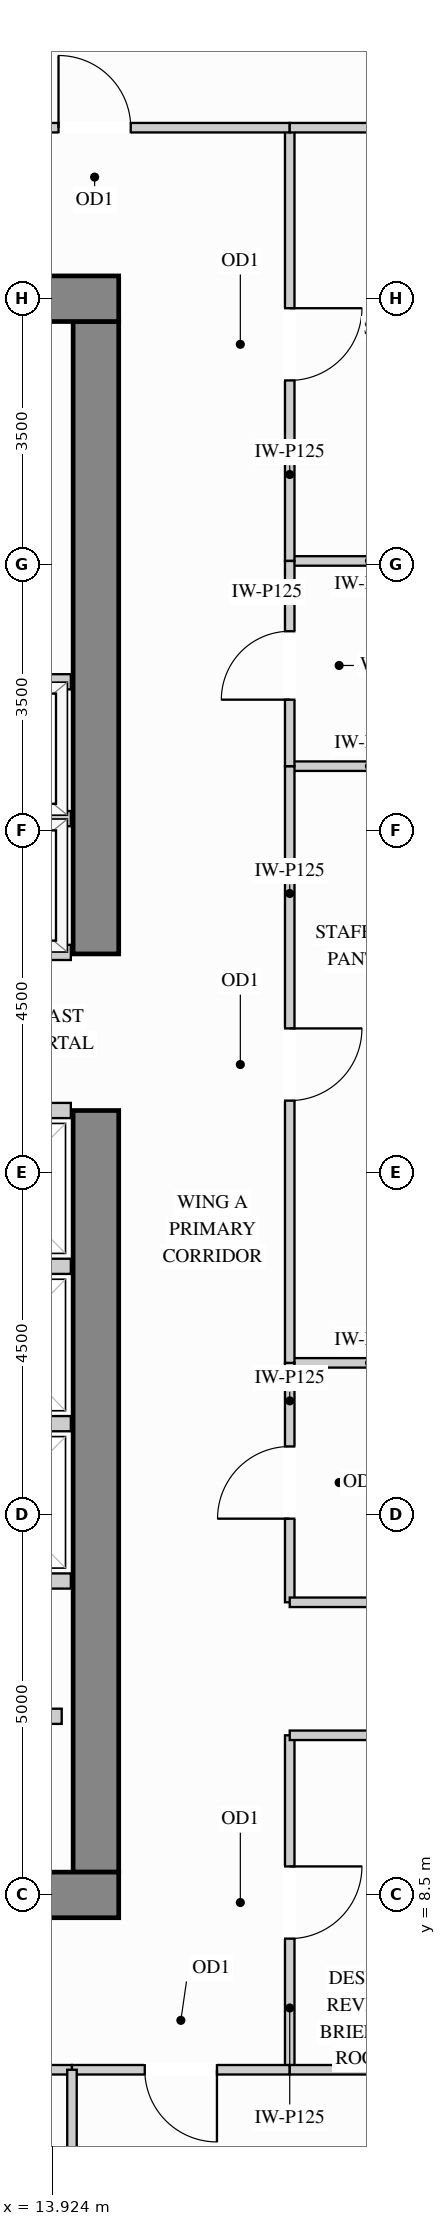
"""IFC4 building model, lengths in metres.
Left out: names, types, materials, properties, quantities, classifications, styles, units other than length and angle.
Written with IfcOpenShell. Run it as: python <this file> out.ifc"""

import sys

from ifc_helpers import new_model, si_unit, direction, frame, frame_2d, origin, place, context, subcontext, project, spatial, rectangle, extrude, source, transform, mapped, element, fill, save


model = new_model("IFC4")
c1 = context("Model", 3, precision=1e-05, world=origin(), true_north=direction((0.0, 1.0)))
c2 = subcontext(c1, "Body", "Model", "MODEL_VIEW")
j1 = project(units=[si_unit("LENGTHUNIT", "METRE"), si_unit("PLANEANGLEUNIT", "RADIAN")], contexts=[c1])
p1 = place(None, origin())
s1 = spatial("IfcSite", under=j1, at=p1, CompositionType="ELEMENT")
p2 = place(p1, origin())
s2 = spatial("IfcBuilding", under=s1, at=p2, CompositionType="ELEMENT")
p3 = place(p2, frame((0.0, 0.0, 175.5)))
s3 = spatial("IfcBuildingStorey", under=s2, at=p3, CompositionType="ELEMENT", Elevation=175.5)
m1 = source(origin(), c2, "Body", "SweptSolid", [
    extrude(rectangle(XDim=10.02, YDim=0.6, at=frame_2d((5.01, 0.0))), origin(), (0.0, 0.0, 1.0), 3.4),
])
p4 = place(p3, frame((14.5, 8.8, 0.0), z_axis=(0.0, 0.0, 1.0), x_axis=(0.0, 1.0, 0.0)))
e1 = element("IfcWall", 1, at=p4, inside=s3, PredefinedType="SHEAR", context=c2, shape_type="MappedRepresentation", body=[
    mapped(m1, transform((0.0, 0.0, 0.0), x_axis=(1.0, 0.0, 0.0), y_axis=(0.0, 1.0, 0.0), z_axis=(0.0, 0.0, 1.0))),
])
m2 = source(origin(), c2, "Body", "SweptSolid", [
    extrude(rectangle(XDim=8.32, YDim=0.6, at=frame_2d((4.16, 0.0))), origin(), (0.0, 0.0, 1.0), 3.4),
])
p5 = place(p3, frame((14.5, 20.88, 0.0), z_axis=(0.0, 0.0, 1.0), x_axis=(0.0, 1.0, 0.0)))
e2 = element("IfcWall", 2, at=p5, inside=s3, PredefinedType="SHEAR", context=c2, shape_type="MappedRepresentation", body=[
    mapped(m2, transform((0.0, 0.0, 0.0), x_axis=(1.0, 0.0, 0.0), y_axis=(0.0, 1.0, 0.0), z_axis=(0.0, 0.0, 1.0))),
])
m3 = source(origin(), c2, "Body", "SweptSolid", [
    extrude(rectangle(XDim=10.6, YDim=0.6, at=frame_2d((5.3, 0.0))), origin(), (0.0, 0.0, 1.0), 3.4),
])
for number, where, z_axis, x_axis in (
    (3, (4.2, 29.5, 0.0), (0.0, 0.0, 1.0), (1.0, 0.0, 0.0)),
    (4, (4.2, 8.5, 0.0), (0.0, 0.0, 1.0), (1.0, 0.0, 0.0)),
):
    element("IfcWall", number, at=place(p3, frame(where, z_axis=z_axis, x_axis=x_axis)), inside=s3, PredefinedType="SHEAR", context=c2, shape_type="MappedRepresentation", body=[
        mapped(m3, transform((0.0, 0.0, 0.0), x_axis=(1.0, 0.0, 0.0), y_axis=(0.0, 1.0, 0.0), z_axis=(0.0, 0.0, 1.0))),
    ])
m4 = source(origin(), c2, "Body", "SweptSolid", [
    extrude(rectangle(XDim=2.1, YDim=0.125, at=frame_2d((1.05, 0.0))), origin(), (0.0, 0.0, 1.0), 3.385),
])
p6 = place(p3, frame((17.05, 15.5, 0.0), z_axis=(0.0, 0.0, 1.0), x_axis=(1.0, 0.0, 0.0)))
e5 = element("IfcWall", 5, at=p6, inside=s3, PredefinedType="PARTITIONING", context=c2, shape_type="MappedRepresentation", body=[
    mapped(m4, transform((0.0, 0.0, 0.0), x_axis=(1.0, 0.0, 0.0), y_axis=(0.0, 1.0, 0.0), z_axis=(0.0, 0.0, 1.0))),
])
m5 = source(origin(), c2, "Body", "SweptSolid", [
    extrude(rectangle(XDim=2.098, YDim=0.125, at=frame_2d((1.049, 0.0))), origin(), (0.0, 0.0, 1.0), 3.385),
])
for number, where, z_axis, x_axis in (
    (6, (17.05, 23.35, 0.0), (0.0, 0.0, 1.0), (1.0, 0.0, 0.0)),
    (7, (17.05, 26.05, 0.0), (0.0, 0.0, 1.0), (1.0, 0.0, 0.0)),
):
    element("IfcWall", number, at=place(p3, frame(where, z_axis=z_axis, x_axis=x_axis)), inside=s3, PredefinedType="PARTITIONING", context=c2, shape_type="MappedRepresentation", body=[
        mapped(m5, transform((0.0, 0.0, 0.0), x_axis=(1.0, 0.0, 0.0), y_axis=(0.0, 1.0, 0.0), z_axis=(0.0, 0.0, 1.0))),
    ])
p7 = place(p3, frame((17.05, 12.35, 0.0), z_axis=(0.0, 0.0, 1.0), x_axis=(0.0, 1.0, 0.0)))
e8 = element("IfcWall", 8, at=p7, inside=s3, PredefinedType="PARTITIONING", context=c2, shape_type="SweptSolid", body=[
    extrude(rectangle(XDim=3.15, YDim=0.125, at=frame_2d((1.575, 0.0))), origin(), (0.0, 0.0, 1.0), 3.385),
])
p8 = place(p7, frame((1.1, 0.0, 0.0)))
e9 = element("IfcOpeningElement", 9, at=p8, cuts=e8, PredefinedType="OPENING", context=c2, shape_type="SweptSolid", body=[
    extrude(rectangle(XDim=0.95, YDim=2.15, at=frame_2d((0.475, 1.075))), frame((0.0, 0.073, 0.0), z_axis=(0.0, -1.0, 0.0), x_axis=(1.0, 0.0, 0.0)), (0.0, 0.0, 1.0), 0.145),
])
p9 = place(p3, frame((17.05, 15.5, 0.0), z_axis=(0.0, 0.0, 1.0), x_axis=(0.0, 1.0, 0.0)))
e10 = element("IfcWall", 10, at=p9, inside=s3, PredefinedType="PARTITIONING", context=c2, shape_type="SweptSolid", body=[
    extrude(rectangle(XDim=7.85, YDim=0.125, at=frame_2d((3.925, 0.0))), origin(), (0.0, 0.0, 1.0), 3.385),
])
p10 = place(p9, frame((3.45, 0.0, 0.0)))
e11 = element("IfcOpeningElement", 11, at=p10, cuts=e10, PredefinedType="OPENING", context=c2, shape_type="SweptSolid", body=[
    extrude(rectangle(XDim=0.95, YDim=2.15, at=frame_2d((0.475, 1.075))), frame((0.0, 0.073, 0.0), z_axis=(0.0, -1.0, 0.0), x_axis=(1.0, 0.0, 0.0)), (0.0, 0.0, 1.0), 0.145),
])
p11 = place(p3, frame((17.05, 26.05, 0.0), z_axis=(0.0, 0.0, 1.0), x_axis=(0.0, 1.0, 0.0)))
e12 = element("IfcWall", 12, at=p11, inside=s3, PredefinedType="PARTITIONING", context=c2, shape_type="SweptSolid", body=[
    extrude(rectangle(XDim=5.7, YDim=0.125, at=frame_2d((2.85, 0.0))), origin(), (0.0, 0.0, 1.0), 3.385),
])
p12 = place(p11, frame((2.375, 0.0, 0.0)))
e13 = element("IfcOpeningElement", 13, at=p12, cuts=e12, PredefinedType="OPENING", context=c2, shape_type="SweptSolid", body=[
    extrude(rectangle(XDim=0.95, YDim=2.15, at=frame_2d((0.475, 1.075))), frame((0.0, 0.073, 0.0), z_axis=(0.0, -1.0, 0.0), x_axis=(1.0, 0.0, 0.0)), (0.0, 0.0, 1.0), 0.145),
])
p13 = place(p3, frame((17.05, 6.2, 0.0), z_axis=(0.0, 0.0, 1.0), x_axis=(0.0, 1.0, 0.0)))
e14 = element("IfcWall", 14, at=p13, inside=s3, PredefinedType="PARTITIONING", context=c2, shape_type="SweptSolid", body=[
    extrude(rectangle(XDim=4.4, YDim=0.125, at=frame_2d((2.2, 0.0))), origin(), (0.0, 0.0, 1.0), 3.385),
])
p14 = place(p13, frame((1.725, 0.0, 0.0)))
e15 = element("IfcOpeningElement", 15, at=p14, cuts=e14, PredefinedType="OPENING", context=c2, shape_type="SweptSolid", body=[
    extrude(rectangle(XDim=0.95, YDim=2.15, at=frame_2d((0.475, 1.075))), frame((0.0, 0.073, 0.0), z_axis=(0.0, -1.0, 0.0), x_axis=(1.0, 0.0, 0.0)), (0.0, 0.0, 1.0), 0.145),
])
p15 = place(p3, frame((17.05, 23.35, 0.0), z_axis=(0.0, 0.0, 1.0), x_axis=(0.0, 1.0, 0.0)))
e16 = element("IfcWall", 16, at=p15, inside=s3, PredefinedType="PARTITIONING", context=c2, shape_type="SweptSolid", body=[
    extrude(rectangle(XDim=2.7, YDim=0.125, at=frame_2d((1.35, 0.0))), origin(), (0.0, 0.0, 1.0), 3.385),
])
p16 = place(p15, frame((0.875, 0.0, 0.0)))
e17 = element("IfcOpeningElement", 17, at=p16, cuts=e16, PredefinedType="OPENING", context=c2, shape_type="SweptSolid", body=[
    extrude(rectangle(XDim=0.9, YDim=2.15, at=frame_2d((0.45, 1.075))), frame((0.0, 0.073, 0.0), z_axis=(0.0, -1.0, 0.0), x_axis=(1.0, 0.0, 0.0)), (0.0, 0.0, 1.0), 0.145),
])
p17 = place(p3, frame((11.916, 31.75, 0.0), z_axis=(0.0, 0.0, 1.0), x_axis=(1.0, 0.0, 0.0)))
e18 = element("IfcWall", 18, at=p17, inside=s3, PredefinedType="PARTITIONING", context=c2, shape_type="SweptSolid", body=[
    extrude(rectangle(XDim=5.134, YDim=0.125, at=frame_2d((2.567, 0.0))), origin(), (0.0, 0.0, 1.0), 2.848),
])
p18 = place(p17, frame((2.092, 0.0, 0.0)))
e19 = element("IfcOpeningElement", 19, at=p18, cuts=e18, PredefinedType="OPENING", context=c2, shape_type="SweptSolid", body=[
    extrude(rectangle(XDim=0.95, YDim=2.15, at=frame_2d((0.475, 1.075))), frame((0.0, 0.073, 0.0), z_axis=(0.0, -1.0, 0.0), x_axis=(1.0, 0.0, 0.0)), (0.0, 0.0, 1.0), 0.145),
])
m6 = source(origin(), c2, "Body", "SweptSolid", [
    extrude(rectangle(XDim=2.098, YDim=0.125, at=frame_2d((1.049, 0.0))), origin(), (0.0, 0.0, 1.0), 2.848),
])
p19 = place(p3, frame((17.05, 31.75, 0.0), z_axis=(0.0, 0.0, 1.0), x_axis=(1.0, 0.0, 0.0)))
e20 = element("IfcWall", 20, at=p19, inside=s3, PredefinedType="PARTITIONING", context=c2, shape_type="MappedRepresentation", body=[
    mapped(m6, transform((0.0, 0.0, 0.0), x_axis=(1.0, 0.0, 0.0), y_axis=(0.0, 1.0, 0.0), z_axis=(0.0, 0.0, 1.0))),
])
m7 = source(origin(), c2, "Body", "SweptSolid", [
    extrude(rectangle(XDim=2.45, YDim=0.125, at=frame_2d((1.225, 0.0))), origin(), (0.0, 0.0, 1.0), 3.385),
])
for number, where, z_axis, x_axis in (
    (21, (17.05, 12.35, 0.0), (0.0, 0.0, 1.0), (1.0, 0.0, 0.0)),
    (22, (17.05, 10.6, 0.0), (0.0, 0.0, 1.0), (1.0, 0.0, 0.0)),
):
    element("IfcWall", number, at=place(p3, frame(where, z_axis=z_axis, x_axis=x_axis)), inside=s3, PredefinedType="PARTITIONING", context=c2, shape_type="MappedRepresentation", body=[
        mapped(m7, transform((0.0, 0.0, 0.0), x_axis=(1.0, 0.0, 0.0), y_axis=(0.0, 1.0, 0.0), z_axis=(0.0, 0.0, 1.0))),
    ])
p20 = place(p3, frame((10.544, 6.2, 0.0), z_axis=(0.0, 0.0, 1.0), x_axis=(1.0, 0.0, 0.0)))
e23 = element("IfcWall", 23, at=p20, inside=s3, PredefinedType="PARTITIONING", context=c2, shape_type="SweptSolid", body=[
    extrude(rectangle(XDim=3.641, YDim=0.125, at=frame_2d((1.821, 0.0))), origin(), (0.0, 0.0, 1.0), 2.848),
])
p21 = place(p20, frame((1.345, 0.0, 0.0)))
e24 = element("IfcOpeningElement", 24, at=p21, cuts=e23, PredefinedType="OPENING", context=c2, shape_type="SweptSolid", body=[
    extrude(rectangle(XDim=0.95, YDim=2.15, at=frame_2d((0.475, 1.075))), frame((0.0, 0.073, 0.0), z_axis=(0.0, -1.0, 0.0), x_axis=(1.0, 0.0, 0.0)), (0.0, 0.0, 1.0), 0.145),
])
p22 = place(p3, frame((14.185, 6.2, 0.0), z_axis=(0.0, 0.0, 1.0), x_axis=(1.0, 0.0, 0.0)))
e25 = element("IfcWall", 25, at=p22, inside=s3, PredefinedType="PARTITIONING", context=c2, shape_type="SweptSolid", body=[
    extrude(rectangle(XDim=2.865, YDim=0.125, at=frame_2d((1.433, 0.0))), origin(), (0.0, 0.0, 1.0), 2.848),
])
p23 = place(p22, frame((0.958, 0.0, 0.0)))
e26 = element("IfcOpeningElement", 26, at=p23, cuts=e25, PredefinedType="OPENING", context=c2, shape_type="SweptSolid", body=[
    extrude(rectangle(XDim=0.95, YDim=2.15, at=frame_2d((0.475, 1.075))), frame((0.0, 0.073, 0.0), z_axis=(0.0, -1.0, 0.0), x_axis=(1.0, 0.0, 0.0)), (0.0, 0.0, 1.0), 0.145),
])
p24 = place(p3, frame((17.05, 6.2, 0.0), z_axis=(0.0, 0.0, 1.0), x_axis=(1.0, 0.0, 0.0)))
e27 = element("IfcWall", 27, at=p24, inside=s3, PredefinedType="PARTITIONING", context=c2, shape_type="MappedRepresentation", body=[
    mapped(m6, transform((0.0, 0.0, 0.0), x_axis=(1.0, 0.0, 0.0), y_axis=(0.0, 1.0, 0.0), z_axis=(0.0, 0.0, 1.0))),
])
m8 = source(origin(), c2, "Body", "SweptSolid", [
    extrude(rectangle(XDim=5.08, YDim=0.125, at=frame_2d((2.54, 0.0))), origin(), (0.0, 0.0, 1.0), 3.385),
])
p25 = place(p3, frame((14.185, 1.12, 0.0), z_axis=(0.0, 0.0, 1.0), x_axis=(0.0, 1.0, 0.0)))
e28 = element("IfcWall", 28, at=p25, inside=s3, PredefinedType="PARTITIONING", context=c2, shape_type="MappedRepresentation", body=[
    mapped(m8, transform((0.0, 0.0, 0.0), x_axis=(1.0, 0.0, 0.0), y_axis=(0.0, 1.0, 0.0), z_axis=(0.0, 0.0, 1.0))),
])
m9 = source(origin(), c2, "Body", "SweptSolid", [
    extrude(rectangle(XDim=1.63, YDim=0.2, at=frame_2d((0.815, 0.0))), origin(), (0.0, 0.0, 1.0), 3.385),
])
p26 = place(p3, frame((12.42, 10.85, 0.0), z_axis=(0.0, 0.0, 1.0), x_axis=(1.0, 0.0, 0.0)))
e29 = element("IfcWall", 29, at=p26, inside=s3, PredefinedType="PARTITIONING", context=c2, shape_type="MappedRepresentation", body=[
    mapped(m9, transform((0.0, 0.0, 0.0), x_axis=(1.0, 0.0, 0.0), y_axis=(0.0, 1.0, 0.0), z_axis=(0.0, 0.0, 1.0))),
])
m10 = source(origin(), c2, "Body", "SweptSolid", [
    extrude(rectangle(XDim=2.34, YDim=0.2, at=frame_2d((1.17, 0.0))), origin(), (0.0, 0.0, 1.0), 3.385),
])
for number, where, z_axis, x_axis in (
    (30, (11.83, 22.66, 0.0), (0.0, 0.0, 1.0), (1.0, 0.0, 0.0)),
    (31, (11.83, 20.9, 0.0), (0.0, 0.0, 1.0), (1.0, 0.0, 0.0)),
    (32, (11.83, 24.46, 0.0), (0.0, 0.0, 1.0), (1.0, 0.0, 0.0)),
):
    element("IfcWall", number, at=place(p3, frame(where, z_axis=z_axis, x_axis=x_axis)), inside=s3, PredefinedType="PARTITIONING", context=c2, shape_type="MappedRepresentation", body=[
        mapped(m10, transform((0.0, 0.0, 0.0), x_axis=(1.0, 0.0, 0.0), y_axis=(0.0, 1.0, 0.0), z_axis=(0.0, 0.0, 1.0))),
    ])
m11 = source(origin(), c2, "Body", "SweptSolid", [
    extrude(rectangle(XDim=1.94, YDim=0.2, at=frame_2d((0.97, 0.0))), origin(), (0.0, 0.0, 1.0), 3.385),
])
for number, where, z_axis, x_axis in (
    (33, (12.23, 14.7, 0.0), (0.0, 0.0, 1.0), (1.0, 0.0, 0.0)),
    (34, (12.23, 12.63, 0.0), (0.0, 0.0, 1.0), (1.0, 0.0, 0.0)),
    (35, (12.23, 16.77, 0.0), (0.0, 0.0, 1.0), (1.0, 0.0, 0.0)),
    (36, (12.23, 18.82, 0.0), (0.0, 0.0, 1.0), (1.0, 0.0, 0.0)),
):
    element("IfcWall", number, at=place(p3, frame(where, z_axis=z_axis, x_axis=x_axis)), inside=s3, PredefinedType="PARTITIONING", context=c2, shape_type="MappedRepresentation", body=[
        mapped(m11, transform((0.0, 0.0, 0.0), x_axis=(1.0, 0.0, 0.0), y_axis=(0.0, 1.0, 0.0), z_axis=(0.0, 0.0, 1.0))),
    ])
m12 = source(origin(), c2, "Body", "SweptSolid", [
    extrude(rectangle(XDim=0.95, YDim=2.15, at=frame_2d((0.475, 1.075))), frame((0.0, 0.025, 0.0), z_axis=(0.0, -1.0, 0.0), x_axis=(1.0, 0.0, 0.0)), (0.0, 0.0, 1.0), 0.05),
])
p27 = place(p14, origin())
e37 = element("IfcDoor", 37, at=p27, inside=s3, OperationType="SINGLE_SWING_RIGHT", PredefinedType="DOOR", context=c2, shape_type="MappedRepresentation", body=[
    mapped(m12, transform((0.0, 0.0, 0.0), x_axis=(1.0, 0.0, 0.0), y_axis=(0.0, 1.0, 0.0), z_axis=(0.0, 0.0, 1.0))),
])
fill(e15, e37)
p28 = place(p8, origin())
e38 = element("IfcDoor", 38, at=p28, inside=s3, OperationType="SINGLE_SWING_LEFT", PredefinedType="DOOR", context=c2, shape_type="MappedRepresentation", body=[
    mapped(m12, transform((0.0, 0.0, 0.0), x_axis=(1.0, 0.0, 0.0), y_axis=(0.0, 1.0, 0.0), z_axis=(0.0, 0.0, 1.0))),
])
fill(e9, e38)
p29 = place(p10, origin())
e39 = element("IfcDoor", 39, at=p29, inside=s3, OperationType="SINGLE_SWING_RIGHT", PredefinedType="DOOR", context=c2, shape_type="MappedRepresentation", body=[
    mapped(m12, transform((0.0, 0.0, 0.0), x_axis=(1.0, 0.0, 0.0), y_axis=(0.0, 1.0, 0.0), z_axis=(0.0, 0.0, 1.0))),
])
fill(e11, e39)
p30 = place(p12, origin())
e40 = element("IfcDoor", 40, at=p30, inside=s3, OperationType="SINGLE_SWING_RIGHT", PredefinedType="DOOR", context=c2, shape_type="MappedRepresentation", body=[
    mapped(m12, transform((0.0, 0.0, 0.0), x_axis=(1.0, 0.0, 0.0), y_axis=(0.0, 1.0, 0.0), z_axis=(0.0, 0.0, 1.0))),
])
fill(e13, e40)
p31 = place(p18, origin())
e41 = element("IfcDoor", 41, at=p31, inside=s3, OperationType="SINGLE_SWING_LEFT", PredefinedType="DOOR", context=c2, shape_type="MappedRepresentation", body=[
    mapped(m12, transform((0.0, 0.0, 0.0), x_axis=(1.0, 0.0, 0.0), y_axis=(0.0, 1.0, 0.0), z_axis=(0.0, 0.0, 1.0))),
])
fill(e19, e41)
p32 = place(p23, origin())
e42 = element("IfcDoor", 42, at=p32, inside=s3, OperationType="SINGLE_SWING_RIGHT", PredefinedType="DOOR", context=c2, shape_type="MappedRepresentation", body=[
    mapped(m12, transform((0.0, 0.0, 0.0), x_axis=(1.0, 0.0, 0.0), y_axis=(0.0, 1.0, 0.0), z_axis=(0.0, 0.0, 1.0))),
])
fill(e26, e42)
m13 = source(origin(), c2, "Body", "SweptSolid", [
    extrude(rectangle(XDim=0.9, YDim=2.15, at=frame_2d((0.45, 1.075))), frame((0.0, 0.025, 0.0), z_axis=(0.0, -1.0, 0.0), x_axis=(1.0, 0.0, 0.0)), (0.0, 0.0, 1.0), 0.05),
])
p33 = place(p16, origin())
e43 = element("IfcDoor", 43, at=p33, inside=s3, OperationType="SINGLE_SWING_LEFT", PredefinedType="DOOR", context=c2, shape_type="MappedRepresentation", body=[
    mapped(m13, transform((0.0, 0.0, 0.0), x_axis=(1.0, 0.0, 0.0), y_axis=(0.0, 1.0, 0.0), z_axis=(0.0, 0.0, 1.0))),
])
fill(e17, e43)
save(model, sys.argv[1])
